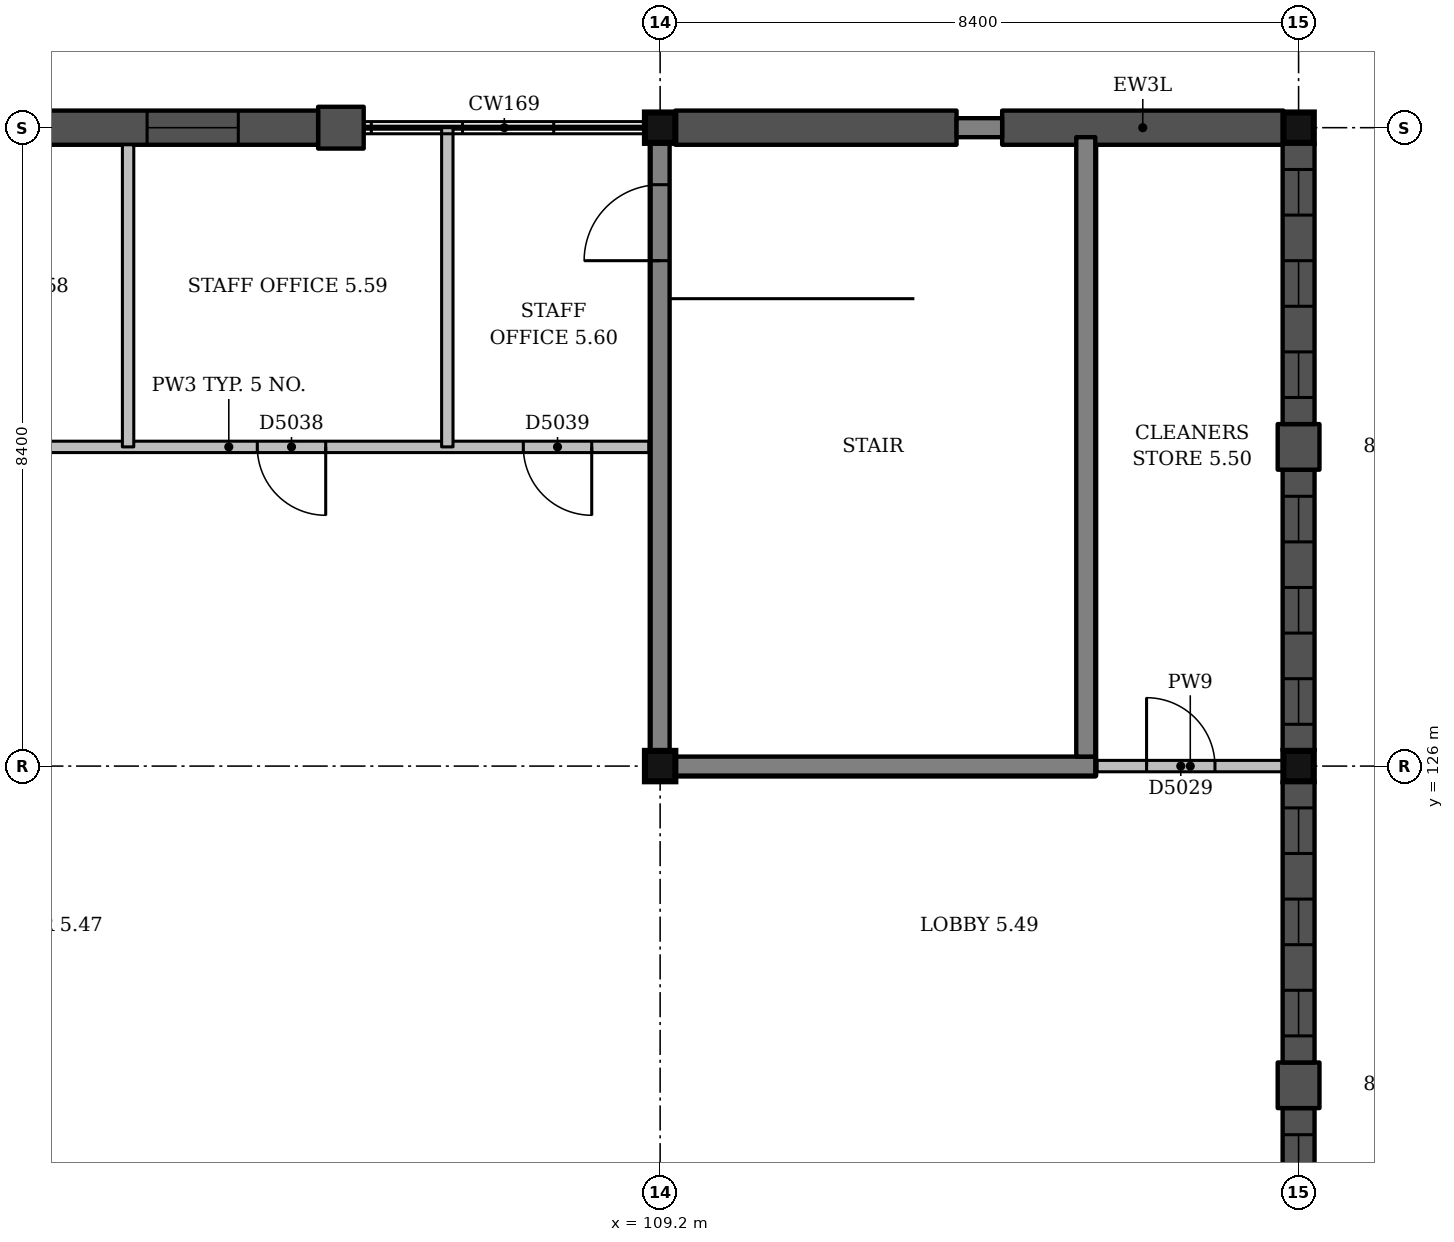
"""IFC4 building model, lengths in metres.
Left out: names, types, materials, properties, quantities, classifications, styles, units other than length and angle.
Written with IfcOpenShell. Run it as: python <this file> out.ifc"""

import sys

from ifc_helpers import new_model, si_unit, direction, frame, frame_2d, origin, origin_2d, place, context, subcontext, project, spatial, rectangle, extrude, element, fill, save


model = new_model("IFC4")
c1 = context("Model", 3, precision=1e-05, world=origin(), true_north=direction((0.0, 1.0)))
c2 = subcontext(c1, "Body", "Model", "MODEL_VIEW")
j1 = project(units=[si_unit("LENGTHUNIT", "METRE"), si_unit("PLANEANGLEUNIT", "RADIAN")], contexts=[c1])
p1 = place(None, origin())
s1 = spatial("IfcSite", under=j1, at=p1, CompositionType="ELEMENT")
p2 = place(p1, origin())
s2 = spatial("IfcBuilding", under=s1, at=p2, CompositionType="ELEMENT")
p3 = place(p2, frame((0.0, 0.0, 22.5)))
s3 = spatial("IfcBuildingStorey", under=s2, at=p3, CompositionType="ELEMENT", Elevation=22.5)
for number, where, z_axis, x_axis in (
    (1, (109.2, 126.0, 0.0), (0.0, 0.0, 1.0), (1.0, 0.0, 0.0)),
    (2, (109.2, 134.4, 0.0), (0.0, 0.0, 1.0), (1.0, 0.0, 0.0)),
    (3, (117.6, 126.0, 0.0), (0.0, 0.0, 1.0), (1.0, 0.0, 0.0)),
    (4, (117.6, 134.4, 0.0), (0.0, 0.0, 1.0), (1.0, 0.0, 0.0)),
):
    element("IfcColumn", number, at=place(p3, frame(where, z_axis=z_axis, x_axis=x_axis)), inside=s3, PredefinedType="COLUMN", context=c2, shape_type="SweptSolid", body=[
        extrude(rectangle(XDim=0.4, YDim=0.4, at=origin_2d()), origin(), (0.0, 0.0, 1.0), 4.5),
    ])
p4 = place(p3, frame((109.4, 126.0, 0.0), z_axis=(0.0, 0.0, 1.0), x_axis=(1.0, 0.0, 0.0)))
e5 = element("IfcWall", 5, at=p4, inside=s3, PredefinedType="SHEAR", context=c2, shape_type="SweptSolid", body=[
    extrude(rectangle(XDim=5.525, YDim=0.25, at=frame_2d((2.763, 0.0))), origin(), (0.0, 0.0, 1.0), 4.2),
])
p5 = place(p3, frame((109.2, 126.2, 0.0), z_axis=(0.0, 0.0, 1.0), x_axis=(0.0, 1.0, 0.0)))
e6 = element("IfcWall", 6, at=p5, inside=s3, PredefinedType="SHEAR", context=c2, shape_type="SweptSolid", body=[
    extrude(rectangle(XDim=8.0, YDim=0.25, at=frame_2d((4.0, 0.0))), origin(), (0.0, 0.0, 1.0), 4.2),
])
p6 = place(p5, frame((6.45, 0.0, 0.0)))
e7 = element("IfcOpeningElement", 7, at=p6, cuts=e6, PredefinedType="OPENING", context=c2, shape_type="SweptSolid", body=[
    extrude(rectangle(XDim=1.0, YDim=2.1, at=frame_2d((0.5, 1.05))), frame((0.0, 0.135, 0.0), z_axis=(0.0, -1.0, 0.0), x_axis=(1.0, 0.0, 0.0)), (0.0, 0.0, 1.0), 0.27),
])
p7 = place(p3, frame((114.8, 126.125, 0.0), z_axis=(0.0, 0.0, 1.0), x_axis=(0.0, 1.0, 0.0)))
e8 = element("IfcWall", 8, at=p7, inside=s3, PredefinedType="SHEAR", context=c2, shape_type="SweptSolid", body=[
    extrude(rectangle(XDim=8.15, YDim=0.25, at=frame_2d((4.075, 0.0))), origin(), (0.0, 0.0, 1.0), 4.2),
])
p8 = place(p3, frame((117.6, 117.8, 0.0), z_axis=(0.0, 0.0, 1.0), x_axis=(0.0, 1.0, 0.0)))
e9 = element("IfcWall", 9, at=p8, inside=s3, PredefinedType="SOLIDWALL", context=c2, shape_type="SweptSolid", body=[
    extrude(rectangle(XDim=3.7, YDim=0.42, at=frame_2d((1.85, 0.0))), origin(), (0.0, 0.0, 1.0), 3.6),
])
p9 = place(p8, frame((0.35, 0.0, 1.0)))
e10 = element("IfcOpeningElement", 10, at=p9, cuts=e9, PredefinedType="OPENING", context=c2, shape_type="SweptSolid", body=[
    extrude(rectangle(XDim=0.6, YDim=2.1, at=frame_2d((0.3, 1.05))), frame((0.0, 0.22, 0.0), z_axis=(0.0, -1.0, 0.0), x_axis=(1.0, 0.0, 0.0)), (0.0, 0.0, 1.0), 0.44),
])
p10 = place(p8, frame((1.55, 0.0, 1.0)))
e11 = element("IfcOpeningElement", 11, at=p10, cuts=e9, PredefinedType="OPENING", context=c2, shape_type="SweptSolid", body=[
    extrude(rectangle(XDim=0.6, YDim=2.1, at=frame_2d((0.3, 1.05))), frame((0.0, 0.22, 0.0), z_axis=(0.0, -1.0, 0.0), x_axis=(1.0, 0.0, 0.0)), (0.0, 0.0, 1.0), 0.44),
])
p11 = place(p8, frame((2.75, 0.0, 1.0)))
e12 = element("IfcOpeningElement", 12, at=p11, cuts=e9, PredefinedType="OPENING", context=c2, shape_type="SweptSolid", body=[
    extrude(rectangle(XDim=0.6, YDim=2.1, at=frame_2d((0.3, 1.05))), frame((0.0, 0.22, 0.0), z_axis=(0.0, -1.0, 0.0), x_axis=(1.0, 0.0, 0.0)), (0.0, 0.0, 1.0), 0.44),
])
p12 = place(p3, frame((117.6, 121.5, 0.0), z_axis=(0.0, 0.0, 1.0), x_axis=(0.0, 1.0, 0.0)))
e13 = element("IfcWall", 13, at=p12, inside=s3, PredefinedType="SOLIDWALL", context=c2, shape_type="SweptSolid", body=[
    extrude(rectangle(XDim=0.6, YDim=0.55, at=frame_2d((0.3, 0.0))), origin(), (0.0, 0.0, 1.0), 3.6),
])
p13 = place(p3, frame((117.6, 122.1, 0.0), z_axis=(0.0, 0.0, 1.0), x_axis=(0.0, 1.0, 0.0)))
e14 = element("IfcWall", 14, at=p13, inside=s3, PredefinedType="SOLIDWALL", context=c2, shape_type="SweptSolid", body=[
    extrude(rectangle(XDim=3.7, YDim=0.42, at=frame_2d((1.85, 0.0))), origin(), (0.0, 0.0, 1.0), 3.6),
])
p14 = place(p13, frame((0.35, 0.0, 1.0)))
e15 = element("IfcOpeningElement", 15, at=p14, cuts=e14, PredefinedType="OPENING", context=c2, shape_type="SweptSolid", body=[
    extrude(rectangle(XDim=0.6, YDim=2.1, at=frame_2d((0.3, 1.05))), frame((0.0, 0.22, 0.0), z_axis=(0.0, -1.0, 0.0), x_axis=(1.0, 0.0, 0.0)), (0.0, 0.0, 1.0), 0.44),
])
p15 = place(p13, frame((1.55, 0.0, 1.0)))
e16 = element("IfcOpeningElement", 16, at=p15, cuts=e14, PredefinedType="OPENING", context=c2, shape_type="SweptSolid", body=[
    extrude(rectangle(XDim=0.6, YDim=2.1, at=frame_2d((0.3, 1.05))), frame((0.0, 0.22, 0.0), z_axis=(0.0, -1.0, 0.0), x_axis=(1.0, 0.0, 0.0)), (0.0, 0.0, 1.0), 0.44),
])
p16 = place(p13, frame((2.75, 0.0, 1.0)))
e17 = element("IfcOpeningElement", 17, at=p16, cuts=e14, PredefinedType="OPENING", context=c2, shape_type="SweptSolid", body=[
    extrude(rectangle(XDim=0.6, YDim=2.1, at=frame_2d((0.3, 1.05))), frame((0.0, 0.22, 0.0), z_axis=(0.0, -1.0, 0.0), x_axis=(1.0, 0.0, 0.0)), (0.0, 0.0, 1.0), 0.44),
])
p17 = place(p3, frame((117.6, 126.2, 0.0), z_axis=(0.0, 0.0, 1.0), x_axis=(0.0, 1.0, 0.0)))
e18 = element("IfcWall", 18, at=p17, inside=s3, PredefinedType="SOLIDWALL", context=c2, shape_type="SweptSolid", body=[
    extrude(rectangle(XDim=3.7, YDim=0.42, at=frame_2d((1.85, 0.0))), origin(), (0.0, 0.0, 1.0), 3.6),
])
p18 = place(p17, frame((0.35, 0.0, 1.0)))
e19 = element("IfcOpeningElement", 19, at=p18, cuts=e18, PredefinedType="OPENING", context=c2, shape_type="SweptSolid", body=[
    extrude(rectangle(XDim=0.6, YDim=2.1, at=frame_2d((0.3, 1.05))), frame((0.0, 0.22, 0.0), z_axis=(0.0, -1.0, 0.0), x_axis=(1.0, 0.0, 0.0)), (0.0, 0.0, 1.0), 0.44),
])
p19 = place(p17, frame((1.55, 0.0, 1.0)))
e20 = element("IfcOpeningElement", 20, at=p19, cuts=e18, PredefinedType="OPENING", context=c2, shape_type="SweptSolid", body=[
    extrude(rectangle(XDim=0.6, YDim=2.1, at=frame_2d((0.3, 1.05))), frame((0.0, 0.22, 0.0), z_axis=(0.0, -1.0, 0.0), x_axis=(1.0, 0.0, 0.0)), (0.0, 0.0, 1.0), 0.44),
])
p20 = place(p17, frame((2.75, 0.0, 1.0)))
e21 = element("IfcOpeningElement", 21, at=p20, cuts=e18, PredefinedType="OPENING", context=c2, shape_type="SweptSolid", body=[
    extrude(rectangle(XDim=0.6, YDim=2.1, at=frame_2d((0.3, 1.05))), frame((0.0, 0.22, 0.0), z_axis=(0.0, -1.0, 0.0), x_axis=(1.0, 0.0, 0.0)), (0.0, 0.0, 1.0), 0.44),
])
p21 = place(p3, frame((117.6, 129.9, 0.0), z_axis=(0.0, 0.0, 1.0), x_axis=(0.0, 1.0, 0.0)))
e22 = element("IfcWall", 22, at=p21, inside=s3, PredefinedType="SOLIDWALL", context=c2, shape_type="SweptSolid", body=[
    extrude(rectangle(XDim=0.6, YDim=0.55, at=frame_2d((0.3, 0.0))), origin(), (0.0, 0.0, 1.0), 3.6),
])
p22 = place(p3, frame((117.6, 130.5, 0.0), z_axis=(0.0, 0.0, 1.0), x_axis=(0.0, 1.0, 0.0)))
e23 = element("IfcWall", 23, at=p22, inside=s3, PredefinedType="SOLIDWALL", context=c2, shape_type="SweptSolid", body=[
    extrude(rectangle(XDim=3.7, YDim=0.42, at=frame_2d((1.85, 0.0))), origin(), (0.0, 0.0, 1.0), 3.6),
])
p23 = place(p22, frame((0.35, 0.0, 1.0)))
e24 = element("IfcOpeningElement", 24, at=p23, cuts=e23, PredefinedType="OPENING", context=c2, shape_type="SweptSolid", body=[
    extrude(rectangle(XDim=0.6, YDim=2.1, at=frame_2d((0.3, 1.05))), frame((0.0, 0.22, 0.0), z_axis=(0.0, -1.0, 0.0), x_axis=(1.0, 0.0, 0.0)), (0.0, 0.0, 1.0), 0.44),
])
p24 = place(p22, frame((1.55, 0.0, 1.0)))
e25 = element("IfcOpeningElement", 25, at=p24, cuts=e23, PredefinedType="OPENING", context=c2, shape_type="SweptSolid", body=[
    extrude(rectangle(XDim=0.6, YDim=2.1, at=frame_2d((0.3, 1.05))), frame((0.0, 0.22, 0.0), z_axis=(0.0, -1.0, 0.0), x_axis=(1.0, 0.0, 0.0)), (0.0, 0.0, 1.0), 0.44),
])
p25 = place(p22, frame((2.75, 0.0, 1.0)))
e26 = element("IfcOpeningElement", 26, at=p25, cuts=e23, PredefinedType="OPENING", context=c2, shape_type="SweptSolid", body=[
    extrude(rectangle(XDim=0.6, YDim=2.1, at=frame_2d((0.3, 1.05))), frame((0.0, 0.22, 0.0), z_axis=(0.0, -1.0, 0.0), x_axis=(1.0, 0.0, 0.0)), (0.0, 0.0, 1.0), 0.44),
])
p26 = place(p3, frame((117.4, 134.4, 0.0), z_axis=(0.0, 0.0, 1.0), x_axis=(-1.0, 0.0, 0.0)))
e27 = element("IfcWall", 27, at=p26, inside=s3, PredefinedType="SOLIDWALL", context=c2, shape_type="SweptSolid", body=[
    extrude(rectangle(XDim=3.7, YDim=0.45, at=frame_2d((1.85, 0.0))), origin(), (0.0, 0.0, 1.0), 3.6),
])
p27 = place(p3, frame((113.1, 134.4, 0.0), z_axis=(0.0, 0.0, 1.0), x_axis=(-1.0, 0.0, 0.0)))
e28 = element("IfcWall", 28, at=p27, inside=s3, PredefinedType="SOLIDWALL", context=c2, shape_type="SweptSolid", body=[
    extrude(rectangle(XDim=3.7, YDim=0.45, at=frame_2d((1.85, 0.0))), origin(), (0.0, 0.0, 1.0), 3.6),
])
p28 = place(p3, frame((105.3, 134.4, 0.0), z_axis=(0.0, 0.0, 1.0), x_axis=(-1.0, 0.0, 0.0)))
e29 = element("IfcWall", 29, at=p28, inside=s3, PredefinedType="SOLIDWALL", context=c2, shape_type="SweptSolid", body=[
    extrude(rectangle(XDim=0.6, YDim=0.55, at=frame_2d((0.3, 0.0))), origin(), (0.0, 0.0, 1.0), 3.6),
])
p29 = place(p3, frame((104.7, 134.4, 0.0), z_axis=(0.0, 0.0, 1.0), x_axis=(-1.0, 0.0, 0.0)))
e30 = element("IfcWall", 30, at=p29, inside=s3, PredefinedType="SOLIDWALL", context=c2, shape_type="SweptSolid", body=[
    extrude(rectangle(XDim=3.7, YDim=0.45, at=frame_2d((1.85, 0.0))), origin(), (0.0, 0.0, 1.0), 3.6),
])
p30 = place(p29, frame((1.05, 0.0, 0.9)))
e31 = element("IfcOpeningElement", 31, at=p30, cuts=e30, PredefinedType="OPENING", context=c2, shape_type="SweptSolid", body=[
    extrude(rectangle(XDim=1.2, YDim=2.1, at=frame_2d((0.6, 1.05))), frame((0.0, 0.235, 0.0), z_axis=(0.0, -1.0, 0.0), x_axis=(1.0, 0.0, 0.0)), (0.0, 0.0, 1.0), 0.47),
])
p31 = place(p3, frame((114.95, 126.0, 0.0), z_axis=(0.0, 0.0, 1.0), x_axis=(1.0, 0.0, 0.0)))
e32 = element("IfcWall", 32, at=p31, inside=s3, PredefinedType="PARTITIONING", context=c2, shape_type="SweptSolid", body=[
    extrude(rectangle(XDim=2.45, YDim=0.15, at=frame_2d((1.225, 0.0))), origin(), (0.0, 0.0, 1.0), 3.6),
])
p32 = place(p31, frame((0.65, 0.0, 0.0)))
e33 = element("IfcOpeningElement", 33, at=p32, cuts=e32, PredefinedType="OPENING", context=c2, shape_type="SweptSolid", body=[
    extrude(rectangle(XDim=0.9, YDim=2.1, at=frame_2d((0.45, 1.05))), frame((0.0, 0.085, 0.0), z_axis=(0.0, -1.0, 0.0), x_axis=(1.0, 0.0, 0.0)), (0.0, 0.0, 1.0), 0.17),
])
p33 = place(p3, frame((98.0, 130.2, 0.0), z_axis=(0.0, 0.0, 1.0), x_axis=(1.0, 0.0, 0.0)))
e34 = element("IfcWall", 34, at=p33, inside=s3, PredefinedType="PARTITIONING", context=c2, shape_type="SweptSolid", body=[
    extrude(rectangle(XDim=11.05, YDim=0.15, at=frame_2d((5.525, 0.0))), origin(), (0.0, 0.0, 1.0), 3.6),
])
p34 = place(p33, frame((1.7, 0.0, 0.0)))
e35 = element("IfcOpeningElement", 35, at=p34, cuts=e34, PredefinedType="OPENING", context=c2, shape_type="SweptSolid", body=[
    extrude(rectangle(XDim=0.9, YDim=2.1, at=frame_2d((0.45, 1.05))), frame((0.0, 0.085, 0.0), z_axis=(0.0, -1.0, 0.0), x_axis=(1.0, 0.0, 0.0)), (0.0, 0.0, 1.0), 0.17),
])
p35 = place(p33, frame((5.9, 0.0, 0.0)))
e36 = element("IfcOpeningElement", 36, at=p35, cuts=e34, PredefinedType="OPENING", context=c2, shape_type="SweptSolid", body=[
    extrude(rectangle(XDim=0.9, YDim=2.1, at=frame_2d((0.45, 1.05))), frame((0.0, 0.085, 0.0), z_axis=(0.0, -1.0, 0.0), x_axis=(1.0, 0.0, 0.0)), (0.0, 0.0, 1.0), 0.17),
])
p36 = place(p33, frame((9.4, 0.0, 0.0)))
e37 = element("IfcOpeningElement", 37, at=p36, cuts=e34, PredefinedType="OPENING", context=c2, shape_type="SweptSolid", body=[
    extrude(rectangle(XDim=0.9, YDim=2.1, at=frame_2d((0.45, 1.05))), frame((0.0, 0.085, 0.0), z_axis=(0.0, -1.0, 0.0), x_axis=(1.0, 0.0, 0.0)), (0.0, 0.0, 1.0), 0.17),
])
p37 = place(p3, frame((102.2, 130.2, 0.0), z_axis=(0.0, 0.0, 1.0), x_axis=(0.0, 1.0, 0.0)))
e38 = element("IfcWall", 38, at=p37, inside=s3, PredefinedType="PARTITIONING", context=c2, shape_type="SweptSolid", body=[
    extrude(rectangle(XDim=3.975, YDim=0.15, at=frame_2d((1.988, 0.0))), origin(), (0.0, 0.0, 1.0), 4.15),
])
p38 = place(p3, frame((106.4, 130.2, 0.0), z_axis=(0.0, 0.0, 1.0), x_axis=(0.0, 1.0, 0.0)))
e39 = element("IfcWall", 39, at=p38, inside=s3, PredefinedType="PARTITIONING", context=c2, shape_type="SweptSolid", body=[
    extrude(rectangle(XDim=4.2, YDim=0.15, at=frame_2d((2.1, 0.0))), origin(), (0.0, 0.0, 1.0), 2.37),
])
p39 = place(p3, frame((113.1, 134.4, 0.0), z_axis=(0.0, 0.0, 1.0), x_axis=(1.0, 0.0, 0.0)))
e40 = element("IfcWall", 40, at=p39, inside=s3, PredefinedType="SHEAR", context=c2, shape_type="SweptSolid", body=[
    extrude(rectangle(XDim=0.6, YDim=0.25, at=frame_2d((0.3, 0.0))), origin(), (0.0, 0.0, 1.0), 4.2),
])
p40 = place(p11, origin())
e41 = element("IfcWindow", 41, at=p40, inside=s3, PartitioningType="SINGLE_PANEL", PredefinedType="WINDOW", context=c2, shape_type="SweptSolid", body=[
    extrude(rectangle(XDim=0.6, YDim=2.1, at=frame_2d((0.3, 1.05))), frame((0.0, 0.15, 0.0), z_axis=(0.0, -1.0, 0.0), x_axis=(1.0, 0.0, 0.0)), (0.0, 0.0, 1.0), 0.06),
])
fill(e12, e41)
p41 = place(p14, origin())
e42 = element("IfcWindow", 42, at=p41, inside=s3, PartitioningType="SINGLE_PANEL", PredefinedType="WINDOW", context=c2, shape_type="SweptSolid", body=[
    extrude(rectangle(XDim=0.6, YDim=2.1, at=frame_2d((0.3, 1.05))), frame((0.0, 0.15, 0.0), z_axis=(0.0, -1.0, 0.0), x_axis=(1.0, 0.0, 0.0)), (0.0, 0.0, 1.0), 0.06),
])
fill(e15, e42)
p42 = place(p15, origin())
e43 = element("IfcWindow", 43, at=p42, inside=s3, PartitioningType="SINGLE_PANEL", PredefinedType="WINDOW", context=c2, shape_type="SweptSolid", body=[
    extrude(rectangle(XDim=0.6, YDim=2.1, at=frame_2d((0.3, 1.05))), frame((0.0, 0.15, 0.0), z_axis=(0.0, -1.0, 0.0), x_axis=(1.0, 0.0, 0.0)), (0.0, 0.0, 1.0), 0.06),
])
fill(e16, e43)
p43 = place(p16, origin())
e44 = element("IfcWindow", 44, at=p43, inside=s3, PartitioningType="SINGLE_PANEL", PredefinedType="WINDOW", context=c2, shape_type="SweptSolid", body=[
    extrude(rectangle(XDim=0.6, YDim=2.1, at=frame_2d((0.3, 1.05))), frame((0.0, 0.15, 0.0), z_axis=(0.0, -1.0, 0.0), x_axis=(1.0, 0.0, 0.0)), (0.0, 0.0, 1.0), 0.06),
])
fill(e17, e44)
p44 = place(p18, origin())
e45 = element("IfcWindow", 45, at=p44, inside=s3, PartitioningType="SINGLE_PANEL", PredefinedType="WINDOW", context=c2, shape_type="SweptSolid", body=[
    extrude(rectangle(XDim=0.6, YDim=2.1, at=frame_2d((0.3, 1.05))), frame((0.0, 0.15, 0.0), z_axis=(0.0, -1.0, 0.0), x_axis=(1.0, 0.0, 0.0)), (0.0, 0.0, 1.0), 0.06),
])
fill(e19, e45)
p45 = place(p19, origin())
e46 = element("IfcWindow", 46, at=p45, inside=s3, PartitioningType="SINGLE_PANEL", PredefinedType="WINDOW", context=c2, shape_type="SweptSolid", body=[
    extrude(rectangle(XDim=0.6, YDim=2.1, at=frame_2d((0.3, 1.05))), frame((0.0, 0.15, 0.0), z_axis=(0.0, -1.0, 0.0), x_axis=(1.0, 0.0, 0.0)), (0.0, 0.0, 1.0), 0.06),
])
fill(e20, e46)
p46 = place(p20, origin())
e47 = element("IfcWindow", 47, at=p46, inside=s3, PartitioningType="SINGLE_PANEL", PredefinedType="WINDOW", context=c2, shape_type="SweptSolid", body=[
    extrude(rectangle(XDim=0.6, YDim=2.1, at=frame_2d((0.3, 1.05))), frame((0.0, 0.15, 0.0), z_axis=(0.0, -1.0, 0.0), x_axis=(1.0, 0.0, 0.0)), (0.0, 0.0, 1.0), 0.06),
])
fill(e21, e47)
p47 = place(p23, origin())
e48 = element("IfcWindow", 48, at=p47, inside=s3, PartitioningType="SINGLE_PANEL", PredefinedType="WINDOW", context=c2, shape_type="SweptSolid", body=[
    extrude(rectangle(XDim=0.6, YDim=2.1, at=frame_2d((0.3, 1.05))), frame((0.0, 0.15, 0.0), z_axis=(0.0, -1.0, 0.0), x_axis=(1.0, 0.0, 0.0)), (0.0, 0.0, 1.0), 0.06),
])
fill(e24, e48)
p48 = place(p24, origin())
e49 = element("IfcWindow", 49, at=p48, inside=s3, PartitioningType="SINGLE_PANEL", PredefinedType="WINDOW", context=c2, shape_type="SweptSolid", body=[
    extrude(rectangle(XDim=0.6, YDim=2.1, at=frame_2d((0.3, 1.05))), frame((0.0, 0.15, 0.0), z_axis=(0.0, -1.0, 0.0), x_axis=(1.0, 0.0, 0.0)), (0.0, 0.0, 1.0), 0.06),
])
fill(e25, e49)
p49 = place(p25, origin())
e50 = element("IfcWindow", 50, at=p49, inside=s3, PartitioningType="SINGLE_PANEL", PredefinedType="WINDOW", context=c2, shape_type="SweptSolid", body=[
    extrude(rectangle(XDim=0.6, YDim=2.1, at=frame_2d((0.3, 1.05))), frame((0.0, 0.15, 0.0), z_axis=(0.0, -1.0, 0.0), x_axis=(1.0, 0.0, 0.0)), (0.0, 0.0, 1.0), 0.06),
])
fill(e26, e50)
p50 = place(p30, origin())
e51 = element("IfcWindow", 51, at=p50, inside=s3, PartitioningType="SINGLE_PANEL", PredefinedType="WINDOW", context=c2, shape_type="SweptSolid", body=[
    extrude(rectangle(XDim=1.2, YDim=2.1, at=frame_2d((0.6, 1.05))), frame((0.0, 0.135, 0.0), z_axis=(0.0, -1.0, 0.0), x_axis=(1.0, 0.0, 0.0)), (0.0, 0.0, 1.0), 0.06),
])
fill(e31, e51)
p51 = place(p3, frame((0.0, 0.0, 4.2)))
p52 = place(p51, frame((105.0, 121.8, 0.0)))
p53 = place(p52, frame((0.0, 0.0, 0.25)))
e52 = element("IfcWindow", 52, at=p53, inside=s3, PartitioningType="SINGLE_PANEL", PredefinedType="SKYLIGHT", context=c2, shape_type="SweptSolid", body=[
    extrude(rectangle(XDim=0.9, YDim=1.2, at=origin_2d()), origin(), (0.0, 0.0, 1.0), 0.05),
])
p54 = place(p32, origin())
e53 = element("IfcDoor", 53, at=p54, inside=s3, OperationType="SINGLE_SWING_LEFT", PredefinedType="DOOR", context=c2, shape_type="SweptSolid", body=[
    extrude(rectangle(XDim=0.9, YDim=2.1, at=frame_2d((0.45, 1.05))), frame((0.0, 0.025, 0.0), z_axis=(0.0, -1.0, 0.0), x_axis=(1.0, 0.0, 0.0)), (0.0, 0.0, 1.0), 0.05),
])
fill(e33, e53)
p55 = place(p35, origin())
e54 = element("IfcDoor", 54, at=p55, inside=s3, OperationType="SINGLE_SWING_RIGHT", PredefinedType="DOOR", context=c2, shape_type="SweptSolid", body=[
    extrude(rectangle(XDim=0.9, YDim=2.1, at=frame_2d((0.45, 1.05))), frame((0.0, 0.025, 0.0), z_axis=(0.0, -1.0, 0.0), x_axis=(1.0, 0.0, 0.0)), (0.0, 0.0, 1.0), 0.05),
])
fill(e36, e54)
p56 = place(p36, origin())
e55 = element("IfcDoor", 55, at=p56, inside=s3, OperationType="SINGLE_SWING_RIGHT", PredefinedType="DOOR", context=c2, shape_type="SweptSolid", body=[
    extrude(rectangle(XDim=0.9, YDim=2.1, at=frame_2d((0.45, 1.05))), frame((0.0, 0.025, 0.0), z_axis=(0.0, -1.0, 0.0), x_axis=(1.0, 0.0, 0.0)), (0.0, 0.0, 1.0), 0.05),
])
fill(e37, e55)
p57 = place(p6, origin())
e56 = element("IfcDoor", 56, at=p57, inside=s3, OperationType="SINGLE_SWING_LEFT", PredefinedType="DOOR", context=c2, shape_type="SweptSolid", body=[
    extrude(rectangle(XDim=1.0, YDim=2.1, at=frame_2d((0.5, 1.05))), frame((0.0, 0.025, 0.0), z_axis=(0.0, -1.0, 0.0), x_axis=(1.0, 0.0, 0.0)), (0.0, 0.0, 1.0), 0.05),
])
fill(e7, e56)
save(model, sys.argv[1])
